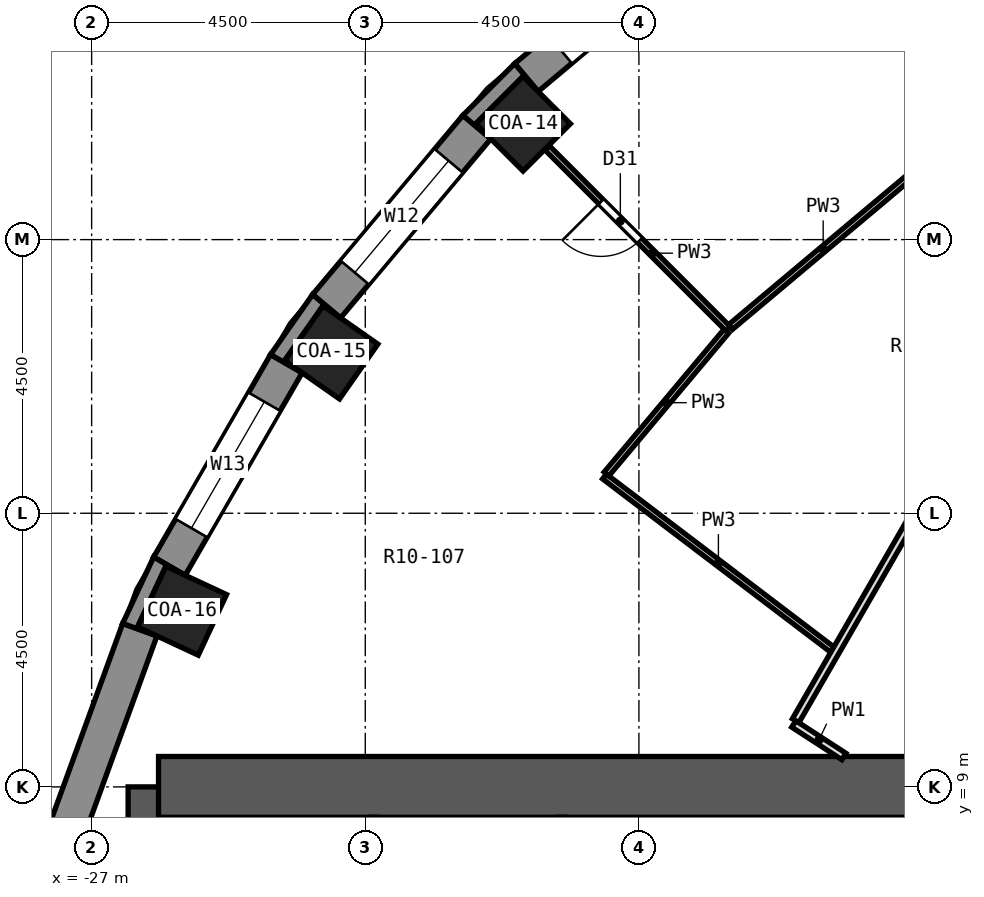
"""IFC4 building model, lengths in metres.
Left out: names, types, materials, properties, quantities, classifications, styles, units other than length and angle.
Written with IfcOpenShell. Run it as: python <this file> out.ifc"""

import sys

from ifc_helpers import new_model, si_unit, direction, frame, frame_2d, origin, origin_2d, place, context, subcontext, project, spatial, polyline, rectangle, outline, extrude, element, fill, save


model = new_model("IFC4")
c1 = context("Model", 3, precision=1e-05, world=origin(), true_north=direction((0.0, 1.0)))
c2 = subcontext(c1, "Body", "Model", "MODEL_VIEW")
j1 = project(units=[si_unit("LENGTHUNIT", "METRE"), si_unit("PLANEANGLEUNIT", "RADIAN")], contexts=[c1])
p1 = place(None, origin())
s1 = spatial("IfcSite", under=j1, at=p1, CompositionType="ELEMENT")
p2 = place(p1, origin())
s2 = spatial("IfcBuilding", under=s1, at=p2, CompositionType="ELEMENT")
p3 = place(p2, frame((0.0, 0.0, 36.2)))
s3 = spatial("IfcBuildingStorey", under=s2, at=p3, CompositionType="ELEMENT", Elevation=36.2)
for number, where, z_axis, x_axis in (
    (1, (-19.905, 19.905, 0.0), (0.0, 0.0, 1.0), (-0.707, 0.707, 0.0)),
    (2, (-23.059, 16.146, 0.0), (0.0, 0.0, 1.0), (-0.819, 0.574, 0.0)),
    (3, (-25.512, 11.897, 0.0), (0.0, 0.0, 1.0), (-0.906, 0.423, 0.0)),
):
    element("IfcColumn", number, at=place(p3, frame(where, z_axis=z_axis, x_axis=x_axis)), inside=s3, PredefinedType="COLUMN", context=c2, shape_type="SweptSolid", body=[
        extrude(rectangle(XDim=1.1, YDim=1.1, at=origin_2d()), origin(), (0.0, 0.0, 1.0), 3.3),
    ])
p4 = place(p3, frame((-13.5, -9.0, 0.0), z_axis=(0.0, 0.0, 1.0), x_axis=(0.0, 1.0, 0.0)))
e4 = element("IfcWall", 4, at=p4, inside=s3, PredefinedType="SHEAR", context=c2, shape_type="SweptSolid", body=[
    extrude(rectangle(XDim=18.0, YDim=1.0, at=frame_2d((9.0, 0.0))), origin(), (0.0, 0.0, 1.0), 3.3),
])
p5 = place(p4, frame((15.4, 0.0, 0.0)))
e5 = element("IfcOpeningElement", 5, at=p5, cuts=e4, PredefinedType="OPENING", context=c2, shape_type="SweptSolid", body=[
    extrude(rectangle(XDim=1.2, YDim=2.1, at=frame_2d((0.6, 1.05))), frame((0.0, 0.512, 0.0), z_axis=(0.0, -1.0, 0.0), x_axis=(1.0, 0.0, 0.0)), (0.0, 0.0, 1.0), 1.024),
])
p6 = place(p4, frame((1.4, 0.0, 0.0)))
e6 = element("IfcOpeningElement", 6, at=p6, cuts=e4, PredefinedType="OPENING", context=c2, shape_type="SweptSolid", body=[
    extrude(rectangle(XDim=1.2, YDim=2.1, at=frame_2d((0.6, 1.05))), frame((0.0, 0.512, 0.0), z_axis=(0.0, -1.0, 0.0), x_axis=(1.0, 0.0, 0.0)), (0.0, 0.0, 1.0), 1.024),
])
p7 = place(p4, frame((7.5, 0.0, 0.0)))
e7 = element("IfcOpeningElement", 7, at=p7, cuts=e4, PredefinedType="OPENING", context=c2, shape_type="SweptSolid", body=[
    extrude(rectangle(XDim=3.0, YDim=2.4, at=frame_2d((1.5, 1.2))), frame((0.0, 0.512, 0.0), z_axis=(0.0, -1.0, 0.0), x_axis=(1.0, 0.0, 0.0)), (0.0, 0.0, 1.0), 1.024),
])
p8 = place(p3, frame((-25.9, -9.0, 0.0), z_axis=(0.0, 0.0, 1.0), x_axis=(0.0, 1.0, 0.0)))
e8 = element("IfcWall", 8, at=p8, inside=s3, PredefinedType="SHEAR", context=c2, shape_type="SweptSolid", body=[
    extrude(rectangle(XDim=18.0, YDim=1.0, at=frame_2d((9.0, 0.0))), origin(), (0.0, 0.0, 1.0), 3.3),
])
p9 = place(p3, frame((-13.5, 9.0, 0.0), z_axis=(0.0, 0.0, 1.0), x_axis=(-1.0, 0.0, 0.0)))
e9 = element("IfcWall", 9, at=p9, inside=s3, PredefinedType="SHEAR", context=c2, shape_type="SweptSolid", body=[
    extrude(rectangle(XDim=12.4, YDim=1.0, at=frame_2d((6.2, 0.0))), origin(), (0.0, 0.0, 1.0), 3.3),
])
p10 = place(p3, frame((-16.904, 23.137, 0.0), z_axis=(0.0, 0.0, 1.0), x_axis=(-0.766026164483, -0.642809392687, 0.0)))
e10 = element("IfcWall", 10, at=p10, inside=s3, PredefinedType="SOLIDWALL", context=c2, shape_type="SweptSolid", body=[
    extrude(rectangle(XDim=3.846, YDim=0.6, at=frame_2d((1.923, 0.0))), origin(), (0.0, 0.0, 1.0), 2.75),
])
p11 = place(p10, frame((0.723, 0.0, 0.9)))
e11 = element("IfcOpeningElement", 11, at=p11, cuts=e10, PredefinedType="OPENING", context=c2, shape_type="SweptSolid", body=[
    extrude(rectangle(XDim=2.4, YDim=1.8, at=frame_2d((1.2, 0.9))), frame((0.0, 0.312, 0.0), z_axis=(0.0, -1.0, 0.0), x_axis=(1.0, 0.0, 0.0)), (0.0, 0.0, 1.0), 0.624),
])
p12 = place(p3, frame((-20.665, 19.85, 0.0), z_axis=(0.0, 0.0, 1.0), x_axis=(-0.642809392687, -0.766026164483, 0.0)))
e12 = element("IfcWall", 12, at=p12, inside=s3, PredefinedType="SOLIDWALL", context=c2, shape_type="SweptSolid", body=[
    extrude(rectangle(XDim=3.846, YDim=0.6, at=frame_2d((1.923, 0.0))), origin(), (0.0, 0.0, 1.0), 2.75),
])
p13 = place(p12, frame((0.723, 0.0, 0.9)))
e13 = element("IfcOpeningElement", 13, at=p13, cuts=e12, PredefinedType="OPENING", context=c2, shape_type="SweptSolid", body=[
    extrude(rectangle(XDim=2.4, YDim=1.8, at=frame_2d((1.2, 0.9))), frame((0.0, 0.312, 0.0), z_axis=(0.0, -1.0, 0.0), x_axis=(1.0, 0.0, 0.0)), (0.0, 0.0, 1.0), 0.624),
])
p14 = place(p3, frame((-23.798, 15.96, 0.0), z_axis=(0.0, 0.0, 1.0), x_axis=(-0.499989888488, -0.86603124159, 0.0)))
e14 = element("IfcWall", 14, at=p14, inside=s3, PredefinedType="SOLIDWALL", context=c2, shape_type="SweptSolid", body=[
    extrude(rectangle(XDim=3.846, YDim=0.6, at=frame_2d((1.923, 0.0))), origin(), (0.0, 0.0, 1.0), 2.75),
])
p15 = place(p14, frame((0.723, 0.0, 0.9)))
e15 = element("IfcOpeningElement", 15, at=p15, cuts=e14, PredefinedType="OPENING", context=c2, shape_type="SweptSolid", body=[
    extrude(rectangle(XDim=2.4, YDim=1.8, at=frame_2d((1.2, 0.9))), frame((0.0, 0.312, 0.0), z_axis=(0.0, -1.0, 0.0), x_axis=(1.0, 0.0, 0.0)), (0.0, 0.0, 1.0), 0.624),
])
p16 = place(p3, frame((-26.208, 11.585, 0.0), z_axis=(0.0, 0.0, 1.0), x_axis=(-0.342028474173, -0.939689588564, 0.0)))
e16 = element("IfcWall", 16, at=p16, inside=s3, PredefinedType="SOLIDWALL", context=c2, shape_type="SweptSolid", body=[
    extrude(rectangle(XDim=3.846, YDim=0.6, at=frame_2d((1.923, 0.0))), origin(), (0.0, 0.0, 1.0), 2.75),
])
p17 = place(p3, origin())
e17 = element("IfcWall", 17, at=p17, inside=s3, PredefinedType="SOLIDWALL", context=c2, shape_type="SweptSolid", body=[
    extrude(outline(polyline([(-20.895, 20.043), (-20.435, 19.657), (-20.683, 19.905), (-19.905, 20.683), (-19.657, 20.435), (-20.043, 20.895), (-20.895, 20.043)])), origin(), (0.0, 0.0, 1.0), 2.75),
])
p18 = place(p3, origin())
e18 = element("IfcWall", 18, at=p18, inside=s3, PredefinedType="SOLIDWALL", context=c2, shape_type="SweptSolid", body=[
    extrude(outline(polyline([(-23.367, 17.097), (-24.058, 16.11), (-23.538, 15.81), (-23.825, 16.011), (-23.194, 16.912), (-22.907, 16.711), (-23.367, 17.097)])), origin(), (0.0, 0.0, 1.0), 2.75),
])
p19 = place(p3, origin())
e19 = element("IfcWall", 19, at=p19, inside=s3, PredefinedType="SOLIDWALL", context=c2, shape_type="SweptSolid", body=[
    extrude(outline(polyline([(-26.49, 11.688), (-25.926, 11.483), (-26.243, 11.631), (-25.779, 12.628), (-25.461, 12.479), (-25.981, 12.78), (-26.49, 11.688)])), origin(), (0.0, 0.0, 1.0), 2.75),
])
p20 = place(p3, frame((-19.509, 19.509, 0.0), z_axis=(0.0, 0.0, 1.0), x_axis=(0.707106781187, -0.707106781187, 0.0)))
e20 = element("IfcWall", 20, at=p20, inside=s3, PredefinedType="PARTITIONING", context=c2, shape_type="SweptSolid", body=[
    extrude(rectangle(XDim=4.212, YDim=0.1, at=frame_2d((2.106, 0.0))), origin(), (0.0, 0.0, 1.0), 2.75),
])
p21 = place(p20, frame((1.252, 0.0, 0.0)))
e21 = element("IfcOpeningElement", 21, at=p21, cuts=e20, PredefinedType="OPENING", context=c2, shape_type="SweptSolid", body=[
    extrude(rectangle(XDim=0.9, YDim=2.1, at=frame_2d((0.45, 1.05))), frame((0.0, 0.062, 0.0), z_axis=(0.0, -1.0, 0.0), x_axis=(1.0, 0.0, 0.0)), (0.0, 0.0, 1.0), 0.124),
])
p22 = place(p3, frame((-18.567, 14.105, 0.0), z_axis=(0.0, 0.0, 1.0), x_axis=(0.796206168274, -0.605025402444, 0.0)))
e22 = element("IfcWall", 22, at=p22, inside=s3, PredefinedType="PARTITIONING", context=c2, shape_type="SweptSolid", body=[
    extrude(rectangle(XDim=4.707, YDim=0.1, at=frame_2d((2.354, 0.0))), origin(), (0.0, 0.0, 1.0), 2.75),
])
p23 = place(p3, frame((-15.453, 10.035, 0.0), z_axis=(0.0, 0.0, 1.0), x_axis=(0.838755766808, -0.544507817801, 0.0)))
e23 = element("IfcWall", 23, at=p23, inside=s3, PredefinedType="PARTITIONING", context=c2, shape_type="SweptSolid", body=[
    extrude(rectangle(XDim=0.982, YDim=0.125, at=frame_2d((0.491, 0.0))), origin(), (0.0, 0.0, 1.0), 2.75),
])
p24 = place(p3, frame((-16.493, 16.563, 0.0), z_axis=(0.0, 0.0, 1.0), x_axis=(0.766012051309, 0.642826210767, 0.0)))
e24 = element("IfcWall", 24, at=p24, inside=s3, PredefinedType="PARTITIONING", context=c2, shape_type="SweptSolid", body=[
    extrude(rectangle(XDim=3.976, YDim=0.1, at=frame_2d((1.988, 0.0))), origin(), (0.0, 0.0, 1.0), 2.75),
])
p25 = place(p3, frame((-18.533, 14.145, 0.0), z_axis=(0.0, 0.0, 1.0), x_axis=(0.642844541506, 0.765996668045, 0.0)))
e25 = element("IfcWall", 25, at=p25, inside=s3, PredefinedType="PARTITIONING", context=c2, shape_type="SweptSolid", body=[
    extrude(rectangle(XDim=3.065, YDim=0.1, at=frame_2d((1.532, 0.0))), origin(), (0.0, 0.0, 1.0), 2.75),
])
p26 = place(p3, frame((-15.422, 10.089, 0.0), z_axis=(0.0, 0.0, 1.0), x_axis=(0.499953532967, 0.866052229876, 0.0)))
e26 = element("IfcWall", 26, at=p26, inside=s3, PredefinedType="PARTITIONING", context=c2, shape_type="SweptSolid", body=[
    extrude(rectangle(XDim=3.841, YDim=0.125, at=frame_2d((1.92, 0.0))), origin(), (0.0, 0.0, 1.0), 2.75),
])
for number, where, z_axis, x_axis in (
    (27, (-19.27, 5.3, 0.0), (0.0, 0.0, 1.0), (0.0, 1.0, 0.0)),
    (28, (-22.36, 5.3, 0.0), (0.0, 0.0, 1.0), (0.0, 1.0, 0.0)),
):
    element("IfcWall", number, at=place(p3, frame(where, z_axis=z_axis, x_axis=x_axis)), inside=s3, PredefinedType="PARTITIONING", context=c2, shape_type="SweptSolid", body=[
        extrude(rectangle(XDim=3.2, YDim=0.1, at=frame_2d((1.6, 0.0))), origin(), (0.0, 0.0, 1.0), 2.75),
    ])
p27 = place(p11, origin())
e29 = element("IfcWindow", 29, at=p27, inside=s3, PartitioningType="SINGLE_PANEL", PredefinedType="WINDOW", context=c2, shape_type="SweptSolid", body=[
    extrude(rectangle(XDim=2.4, YDim=1.8, at=frame_2d((1.2, 0.9))), frame((0.0, 0.18, 0.0), z_axis=(0.0, -1.0, 0.0), x_axis=(1.0, 0.0, 0.0)), (0.0, 0.0, 1.0), 0.06),
])
fill(e11, e29)
p28 = place(p13, origin())
e30 = element("IfcWindow", 30, at=p28, inside=s3, PartitioningType="SINGLE_PANEL", PredefinedType="WINDOW", context=c2, shape_type="SweptSolid", body=[
    extrude(rectangle(XDim=2.4, YDim=1.8, at=frame_2d((1.2, 0.9))), frame((0.0, 0.18, 0.0), z_axis=(0.0, -1.0, 0.0), x_axis=(1.0, 0.0, 0.0)), (0.0, 0.0, 1.0), 0.06),
])
fill(e13, e30)
p29 = place(p15, origin())
e31 = element("IfcWindow", 31, at=p29, inside=s3, PartitioningType="SINGLE_PANEL", PredefinedType="WINDOW", context=c2, shape_type="SweptSolid", body=[
    extrude(rectangle(XDim=2.4, YDim=1.8, at=frame_2d((1.2, 0.9))), frame((0.0, 0.18, 0.0), z_axis=(0.0, -1.0, 0.0), x_axis=(1.0, 0.0, 0.0)), (0.0, 0.0, 1.0), 0.06),
])
fill(e15, e31)
p30 = place(p21, frame((0.9, 0.0, 0.0), z_axis=(0.0, 0.0, 1.0), x_axis=(-1.0, 0.0, 0.0)))
e32 = element("IfcDoor", 32, at=p30, inside=s3, OperationType="SINGLE_SWING_RIGHT", PredefinedType="DOOR", context=c2, shape_type="SweptSolid", body=[
    extrude(rectangle(XDim=0.9, YDim=2.1, at=frame_2d((0.45, 1.05))), frame((0.0, 0.025, 0.0), z_axis=(0.0, -1.0, 0.0), x_axis=(1.0, 0.0, 0.0)), (0.0, 0.0, 1.0), 0.05),
])
fill(e21, e32)
save(model, sys.argv[1])
